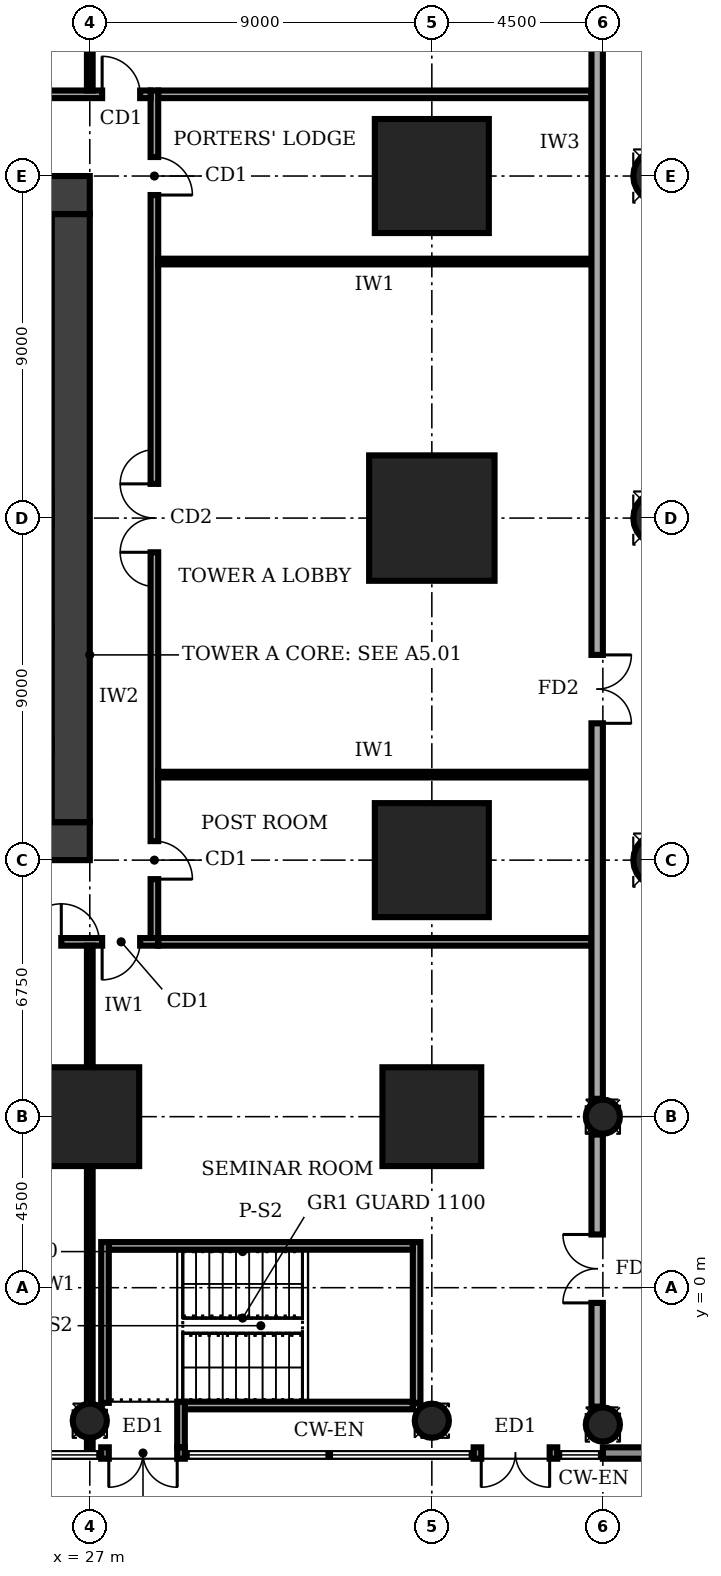
"""IFC4 building model, lengths in metres.
Left out: names, types, materials, properties, quantities, classifications, styles, units other than length and angle.
Written with IfcOpenShell. Run it as: python <this file> out.ifc"""

import sys

from ifc_helpers import new_model, si_unit, direction, frame, frame_2d, origin, origin_2d, place, context, subcontext, project, spatial, rectangle, circle, extrude, element, fill, save


model = new_model("IFC4")
c1 = context("Model", 3, precision=1e-05, world=origin(), true_north=direction((0.0, 1.0)))
c2 = subcontext(c1, "Body", "Model", "MODEL_VIEW")
j1 = project(units=[si_unit("LENGTHUNIT", "METRE"), si_unit("PLANEANGLEUNIT", "RADIAN")], contexts=[c1])
p1 = place(None, origin())
s1 = spatial("IfcSite", under=j1, at=p1, CompositionType="ELEMENT")
p2 = place(p1, origin())
s2 = spatial("IfcBuilding", under=s1, at=p2, CompositionType="ELEMENT")
p3 = place(p2, origin())
s3 = spatial("IfcBuildingStorey", under=s2, at=p3, CompositionType="ELEMENT", Elevation=0.0)
p4 = place(p3, frame((13.5, 11.75, -0.4), z_axis=(0.0, 0.0, 1.0), x_axis=(1.0, 0.0, 0.0)))
e1 = element("IfcWall", 1, at=p4, inside=s3, PredefinedType="SHEAR", context=c2, shape_type="SweptSolid", body=[
    extrude(rectangle(XDim=13.5, YDim=1.0, at=frame_2d((6.75, 0.0))), origin(), (0.0, 0.0, 1.0), 6.4),
])
p5 = place(p4, frame((4.75, 0.0, 0.4)))
e2 = element("IfcOpeningElement", 2, at=p5, cuts=e1, PredefinedType="OPENING", context=c2, shape_type="SweptSolid", body=[
    extrude(rectangle(XDim=1.0, YDim=2.1, at=frame_2d((0.5, 1.05))), frame((0.0, 0.51, 0.0), z_axis=(0.0, -1.0, 0.0), x_axis=(1.0, 0.0, 0.0)), (0.0, 0.0, 1.0), 1.02),
])
p6 = place(p3, frame((26.5, 12.25, -0.4), z_axis=(0.0, 0.0, 1.0), x_axis=(0.0, 1.0, 0.0)))
e3 = element("IfcWall", 3, at=p6, inside=s3, PredefinedType="SHEAR", context=c2, shape_type="SweptSolid", body=[
    extrude(rectangle(XDim=16.0, YDim=1.0, at=frame_2d((8.0, 0.0))), origin(), (0.0, 0.0, 1.0), 6.4),
])
p7 = place(p3, frame((27.0, 28.75, -0.4), z_axis=(0.0, 0.0, 1.0), x_axis=(-1.0, 0.0, 0.0)))
e4 = element("IfcWall", 4, at=p7, inside=s3, PredefinedType="SHEAR", context=c2, shape_type="SweptSolid", body=[
    extrude(rectangle(XDim=13.5, YDim=1.0, at=frame_2d((6.75, 0.0))), origin(), (0.0, 0.0, 1.0), 6.4),
])
p8 = place(p7, frame((4.75, 0.0, 0.4)))
e5 = element("IfcOpeningElement", 5, at=p8, cuts=e4, PredefinedType="OPENING", context=c2, shape_type="SweptSolid", body=[
    extrude(rectangle(XDim=1.8, YDim=2.1, at=frame_2d((0.9, 1.05))), frame((0.0, 0.51, 0.0), z_axis=(0.0, -1.0, 0.0), x_axis=(1.0, 0.0, 0.0)), (0.0, 0.0, 1.0), 1.02),
])
for number, where, z_axis, x_axis in (
    (6, (27.0, 4.5, -0.4), (0.0, 0.0, 1.0), (1.0, 0.0, 0.0)),
    (7, (36.0, 4.5, -0.4), (0.0, 0.0, 1.0), (1.0, 0.0, 0.0)),
):
    element("IfcColumn", number, at=place(p3, frame(where, z_axis=z_axis, x_axis=x_axis)), inside=s3, PredefinedType="COLUMN", context=c2, shape_type="SweptSolid", body=[
        extrude(rectangle(XDim=2.6, YDim=2.6, at=origin_2d()), origin(), (0.0, 0.0, 1.0), 6.4),
    ])
p9 = place(p3, frame((36.0, 11.25, -0.4), z_axis=(0.0, 0.0, 1.0), x_axis=(1.0, 0.0, 0.0)))
e8 = element("IfcColumn", 8, at=p9, inside=s3, PredefinedType="COLUMN", context=c2, shape_type="SweptSolid", body=[
    extrude(rectangle(XDim=3.0, YDim=3.0, at=origin_2d()), origin(), (0.0, 0.0, 1.0), 6.4),
])
p10 = place(p3, frame((36.0, 20.25, -0.4), z_axis=(0.0, 0.0, 1.0), x_axis=(1.0, 0.0, 0.0)))
e9 = element("IfcColumn", 9, at=p10, inside=s3, PredefinedType="COLUMN", context=c2, shape_type="SweptSolid", body=[
    extrude(rectangle(XDim=3.3, YDim=3.3, at=origin_2d()), origin(), (0.0, 0.0, 1.0), 6.4),
])
p11 = place(p3, frame((36.0, 29.25, -0.4), z_axis=(0.0, 0.0, 1.0), x_axis=(1.0, 0.0, 0.0)))
e10 = element("IfcColumn", 10, at=p11, inside=s3, PredefinedType="COLUMN", context=c2, shape_type="SweptSolid", body=[
    extrude(rectangle(XDim=3.0, YDim=3.0, at=origin_2d()), origin(), (0.0, 0.0, 1.0), 6.4),
])
for number, where, z_axis, x_axis in (
    (11, (27.0, -3.5, -0.4), (0.0, 0.0, 1.0), (1.0, 0.0, 0.0)),
    (12, (36.0, -3.5, -0.4), (0.0, 0.0, 1.0), (1.0, 0.0, 0.0)),
    (13, (40.5, -3.6, -0.4), (0.0, 0.0, 1.0), (1.0, 0.0, 0.0)),
    (14, (40.5, 4.5, -0.4), (0.0, 0.0, 1.0), (1.0, 0.0, 0.0)),
):
    element("IfcColumn", number, at=place(p3, frame(where, z_axis=z_axis, x_axis=x_axis)), inside=s3, PredefinedType="COLUMN", context=c2, shape_type="SweptSolid", body=[
        extrude(circle(Radius=0.45, at=origin_2d()), origin(), (0.0, 0.0, 1.0), 6.4),
    ])
for number, where, z_axis, x_axis in (
    (15, (42.0, 11.25, -0.4), (0.0, 0.0, 1.0), (1.0, 0.0, 0.0)),
    (16, (42.0, 20.25, -0.4), (0.0, 0.0, 1.0), (1.0, 0.0, 0.0)),
    (17, (42.0, 29.25, -0.4), (0.0, 0.0, 1.0), (1.0, 0.0, 0.0)),
):
    element("IfcColumn", number, at=place(p3, frame(where, z_axis=z_axis, x_axis=x_axis)), inside=s3, PredefinedType="COLUMN", context=c2, shape_type="SweptSolid", body=[
        extrude(circle(Radius=0.7, at=origin_2d()), origin(), (0.0, 0.0, 1.0), 6.4),
    ])
p12 = place(p3, frame((27.3, -4.35, 0.0), z_axis=(0.0, 0.0, 1.0), x_axis=(1.0, 0.0, 0.0)))
e18 = element("IfcWall", 18, at=p12, inside=s3, PredefinedType="STANDARD", context=c2, shape_type="SweptSolid", body=[
    extrude(rectangle(XDim=2.2, YDim=0.3, at=frame_2d((1.1, 0.0))), origin(), (0.0, 0.0, 1.0), 5.7),
])
p13 = place(p12, frame((0.2, 0.0, 0.0)))
e19 = element("IfcOpeningElement", 19, at=p13, cuts=e18, PredefinedType="OPENING", context=c2, shape_type="SweptSolid", body=[
    extrude(rectangle(XDim=1.8, YDim=2.4, at=frame_2d((0.9, 1.2))), frame((0.0, 0.16, 0.0), z_axis=(0.0, -1.0, 0.0), x_axis=(1.0, 0.0, 0.0)), (0.0, 0.0, 1.0), 0.32),
])
p14 = place(p3, frame((37.1, -4.35, 0.0), z_axis=(0.0, 0.0, 1.0), x_axis=(1.0, 0.0, 0.0)))
e20 = element("IfcWall", 20, at=p14, inside=s3, PredefinedType="STANDARD", context=c2, shape_type="SweptSolid", body=[
    extrude(rectangle(XDim=2.2, YDim=0.3, at=frame_2d((1.1, 0.0))), origin(), (0.0, 0.0, 1.0), 5.7),
])
p15 = place(p14, frame((0.2, 0.0, 0.0)))
e21 = element("IfcOpeningElement", 21, at=p15, cuts=e20, PredefinedType="OPENING", context=c2, shape_type="SweptSolid", body=[
    extrude(rectangle(XDim=1.8, YDim=2.4, at=frame_2d((0.9, 1.2))), frame((0.0, 0.16, 0.0), z_axis=(0.0, -1.0, 0.0), x_axis=(1.0, 0.0, 0.0)), (0.0, 0.0, 1.0), 0.32),
])
p16 = place(p3, frame((40.5, -4.35, 0.0), z_axis=(0.0, 0.0, 1.0), x_axis=(1.0, 0.0, 0.0)))
e22 = element("IfcWall", 22, at=p16, inside=s3, PredefinedType="STANDARD", context=c2, shape_type="SweptSolid", body=[
    extrude(rectangle(XDim=22.5, YDim=0.3, at=frame_2d((11.25, 0.0))), origin(), (0.0, 0.0, 1.0), 5.7),
])
p17 = place(p16, frame((3.6, 0.0, 0.0)))
e23 = element("IfcOpeningElement", 23, at=p17, cuts=e22, PredefinedType="OPENING", context=c2, shape_type="SweptSolid", body=[
    extrude(rectangle(XDim=1.8, YDim=2.4, at=frame_2d((0.9, 1.2))), frame((0.0, 0.16, 0.0), z_axis=(0.0, -1.0, 0.0), x_axis=(1.0, 0.0, 0.0)), (0.0, 0.0, 1.0), 0.32),
])
p18 = place(p16, frame((8.1, 0.0, 0.0)))
e24 = element("IfcOpeningElement", 24, at=p18, cuts=e22, PredefinedType="OPENING", context=c2, shape_type="SweptSolid", body=[
    extrude(rectangle(XDim=1.8, YDim=2.4, at=frame_2d((0.9, 1.2))), frame((0.0, 0.16, 0.0), z_axis=(0.0, -1.0, 0.0), x_axis=(1.0, 0.0, 0.0)), (0.0, 0.0, 1.0), 0.32),
])
p19 = place(p16, frame((18.2, 0.0, 0.0)))
e25 = element("IfcOpeningElement", 25, at=p19, cuts=e22, PredefinedType="OPENING", context=c2, shape_type="SweptSolid", body=[
    extrude(rectangle(XDim=1.8, YDim=2.4, at=frame_2d((0.9, 1.2))), frame((0.0, 0.16, 0.0), z_axis=(0.0, -1.0, 0.0), x_axis=(1.0, 0.0, 0.0)), (0.0, 0.0, 1.0), 0.32),
])
p20 = place(p3, frame((11.9, 9.1, 0.0), z_axis=(0.0, 0.0, 1.0), x_axis=(1.0, 0.0, 0.0)))
e26 = element("IfcWall", 26, at=p20, inside=s3, PredefinedType="SOLIDWALL", context=c2, shape_type="SweptSolid", body=[
    extrude(rectangle(XDim=16.9, YDim=0.2, at=frame_2d((8.45, 0.0))), origin(), (0.0, 0.0, 1.0), 5.7),
])
p21 = place(p20, frame((0.1, 0.0, 0.0)))
e27 = element("IfcOpeningElement", 27, at=p21, cuts=e26, PredefinedType="OPENING", context=c2, shape_type="SweptSolid", body=[
    extrude(rectangle(XDim=1.2, YDim=2.4, at=frame_2d((0.6, 1.2))), frame((0.0, 0.11, 0.0), z_axis=(0.0, -1.0, 0.0), x_axis=(1.0, 0.0, 0.0)), (0.0, 0.0, 1.0), 0.22),
])
p22 = place(p20, frame((2.35, 0.0, 0.0)))
e28 = element("IfcOpeningElement", 28, at=p22, cuts=e26, PredefinedType="OPENING", context=c2, shape_type="SweptSolid", body=[
    extrude(rectangle(XDim=2.0, YDim=2.4, at=frame_2d((1.0, 1.2))), frame((0.0, 0.11, 0.0), z_axis=(0.0, -1.0, 0.0), x_axis=(1.0, 0.0, 0.0)), (0.0, 0.0, 1.0), 0.22),
])
p23 = place(p20, frame((12.35, 0.0, 0.0)))
e29 = element("IfcOpeningElement", 29, at=p23, cuts=e26, PredefinedType="OPENING", context=c2, shape_type="SweptSolid", body=[
    extrude(rectangle(XDim=2.0, YDim=2.4, at=frame_2d((1.0, 1.2))), frame((0.0, 0.11, 0.0), z_axis=(0.0, -1.0, 0.0), x_axis=(1.0, 0.0, 0.0)), (0.0, 0.0, 1.0), 0.22),
])
p24 = place(p20, frame((15.425, 0.0, 0.0)))
e30 = element("IfcOpeningElement", 30, at=p24, cuts=e26, PredefinedType="OPENING", context=c2, shape_type="SweptSolid", body=[
    extrude(rectangle(XDim=1.0, YDim=2.1, at=frame_2d((0.5, 1.05))), frame((0.0, 0.11, 0.0), z_axis=(0.0, -1.0, 0.0), x_axis=(1.0, 0.0, 0.0)), (0.0, 0.0, 1.0), 0.22),
])
p25 = place(p3, frame((28.7, 9.2, 0.0), z_axis=(0.0, 0.0, 1.0), x_axis=(0.0, 1.0, 0.0)))
e31 = element("IfcWall", 31, at=p25, inside=s3, PredefinedType="SOLIDWALL", context=c2, shape_type="SweptSolid", body=[
    extrude(rectangle(XDim=22.3, YDim=0.2, at=frame_2d((11.15, 0.0))), origin(), (0.0, 0.0, 1.0), 5.7),
])
p26 = place(p25, frame((1.55, 0.0, 0.0)))
e32 = element("IfcOpeningElement", 32, at=p26, cuts=e31, PredefinedType="OPENING", context=c2, shape_type="SweptSolid", body=[
    extrude(rectangle(XDim=1.0, YDim=2.1, at=frame_2d((0.5, 1.05))), frame((0.0, 0.11, 0.0), z_axis=(0.0, -1.0, 0.0), x_axis=(1.0, 0.0, 0.0)), (0.0, 0.0, 1.0), 0.22),
])
p27 = place(p25, frame((10.15, 0.0, 0.0)))
e33 = element("IfcOpeningElement", 33, at=p27, cuts=e31, PredefinedType="OPENING", context=c2, shape_type="SweptSolid", body=[
    extrude(rectangle(XDim=1.8, YDim=2.1, at=frame_2d((0.9, 1.05))), frame((0.0, 0.11, 0.0), z_axis=(0.0, -1.0, 0.0), x_axis=(1.0, 0.0, 0.0)), (0.0, 0.0, 1.0), 0.22),
])
p28 = place(p25, frame((19.55, 0.0, 0.0)))
e34 = element("IfcOpeningElement", 34, at=p28, cuts=e31, PredefinedType="OPENING", context=c2, shape_type="SweptSolid", body=[
    extrude(rectangle(XDim=1.0, YDim=2.1, at=frame_2d((0.5, 1.05))), frame((0.0, 0.11, 0.0), z_axis=(0.0, -1.0, 0.0), x_axis=(1.0, 0.0, 0.0)), (0.0, 0.0, 1.0), 0.22),
])
p29 = place(p3, frame((28.6, 31.4, 0.0), z_axis=(0.0, 0.0, 1.0), x_axis=(-1.0, 0.0, 0.0)))
e35 = element("IfcWall", 35, at=p29, inside=s3, PredefinedType="SOLIDWALL", context=c2, shape_type="SweptSolid", body=[
    extrude(rectangle(XDim=16.9, YDim=0.2, at=frame_2d((8.45, 0.0))), origin(), (0.0, 0.0, 1.0), 5.7),
])
p30 = place(p29, frame((15.425, 0.0, 0.0)))
e36 = element("IfcOpeningElement", 36, at=p30, cuts=e35, PredefinedType="OPENING", context=c2, shape_type="SweptSolid", body=[
    extrude(rectangle(XDim=1.0, YDim=2.1, at=frame_2d((0.5, 1.05))), frame((0.0, 0.11, 0.0), z_axis=(0.0, -1.0, 0.0), x_axis=(1.0, 0.0, 0.0)), (0.0, 0.0, 1.0), 0.22),
])
p31 = place(p29, frame((7.45, 0.0, 0.0)))
e37 = element("IfcOpeningElement", 37, at=p31, cuts=e35, PredefinedType="OPENING", context=c2, shape_type="SweptSolid", body=[
    extrude(rectangle(XDim=1.8, YDim=2.1, at=frame_2d((0.9, 1.05))), frame((0.0, 0.11, 0.0), z_axis=(0.0, -1.0, 0.0), x_axis=(1.0, 0.0, 0.0)), (0.0, 0.0, 1.0), 0.22),
])
p32 = place(p29, frame((0.275, 0.0, 0.0)))
e38 = element("IfcOpeningElement", 38, at=p32, cuts=e35, PredefinedType="OPENING", context=c2, shape_type="SweptSolid", body=[
    extrude(rectangle(XDim=1.0, YDim=2.1, at=frame_2d((0.5, 1.05))), frame((0.0, 0.11, 0.0), z_axis=(0.0, -1.0, 0.0), x_axis=(1.0, 0.0, 0.0)), (0.0, 0.0, 1.0), 0.22),
])
for number, where, z_axis, x_axis in (
    (39, (28.8, 9.1, 0.0), (0.0, 0.0, 1.0), (1.0, 0.0, 0.0)),
    (40, (28.8, 31.4, 0.0), (0.0, 0.0, 1.0), (1.0, 0.0, 0.0)),
):
    element("IfcWall", number, at=place(p3, frame(where, z_axis=z_axis, x_axis=x_axis)), inside=s3, PredefinedType="SOLIDWALL", context=c2, shape_type="SweptSolid", body=[
        extrude(rectangle(XDim=11.4, YDim=0.2, at=frame_2d((5.7, 0.0))), origin(), (0.0, 0.0, 1.0), 5.7),
    ])
p33 = place(p3, frame((27.0, -4.32, 0.0), z_axis=(0.0, 0.0, 1.0), x_axis=(0.0, 1.0, 0.0)))
e41 = element("IfcWall", 41, at=p33, inside=s3, PredefinedType="PARTITIONING", context=c2, shape_type="SweptSolid", body=[
    extrude(rectangle(XDim=0.35, YDim=0.15, at=frame_2d((0.175, 0.0))), origin(), (0.0, 0.0, 1.0), 5.7),
])
p34 = place(p3, frame((27.0, -3.03, 0.0), z_axis=(0.0, 0.0, 1.0), x_axis=(0.0, 1.0, 0.0)))
e42 = element("IfcWall", 42, at=p34, inside=s3, PredefinedType="PARTITIONING", context=c2, shape_type="SweptSolid", body=[
    extrude(rectangle(XDim=6.21, YDim=0.15, at=frame_2d((3.105, 0.0))), origin(), (0.0, 0.0, 1.0), 4.7),
])
for number, where, z_axis, x_axis in (
    (43, (27.0, 5.82, 0.0), (0.0, 0.0, 1.0), (0.0, 1.0, 0.0)),
    (44, (27.0, 31.5, 0.0), (0.0, 0.0, 1.0), (0.0, 1.0, 0.0)),
):
    element("IfcWall", number, at=place(p3, frame(where, z_axis=z_axis, x_axis=x_axis)), inside=s3, PredefinedType="PARTITIONING", context=c2, shape_type="SweptSolid", body=[
        extrude(rectangle(XDim=3.18, YDim=0.15, at=frame_2d((1.59, 0.0))), origin(), (0.0, 0.0, 1.0), 4.8),
    ])
for number, where, z_axis, x_axis in (
    (45, (28.8, 13.5, 0.0), (0.0, 0.0, 1.0), (1.0, 0.0, 0.0)),
    (46, (28.8, 27.0, 0.0), (0.0, 0.0, 1.0), (1.0, 0.0, 0.0)),
):
    element("IfcWall", number, at=place(p3, frame(where, z_axis=z_axis, x_axis=x_axis)), inside=s3, PredefinedType="PARTITIONING", context=c2, shape_type="SweptSolid", body=[
        extrude(rectangle(XDim=11.4, YDim=0.15, at=frame_2d((5.7, 0.0))), origin(), (0.0, 0.0, 1.0), 5.7),
    ])
p35 = place(p3, frame((27.5, 1.1, 0.0), z_axis=(0.0, 0.0, 1.0), x_axis=(1.0, 0.0, 0.0)))
e47 = element("IfcWall", 47, at=p35, inside=s3, PredefinedType="SOLIDWALL", context=c2, shape_type="SweptSolid", body=[
    extrude(rectangle(XDim=8.0, YDim=0.2, at=frame_2d((4.0, 0.0))), origin(), (0.0, 0.0, 1.0), 5.7),
])
p36 = place(p3, frame((29.5, -3.1, 0.0), z_axis=(0.0, 0.0, 1.0), x_axis=(1.0, 0.0, 0.0)))
e48 = element("IfcWall", 48, at=p36, inside=s3, PredefinedType="SOLIDWALL", context=c2, shape_type="SweptSolid", body=[
    extrude(rectangle(XDim=6.0, YDim=0.2, at=frame_2d((3.0, 0.0))), origin(), (0.0, 0.0, 1.0), 5.7),
])
p37 = place(p3, frame((29.4, -3.0, 0.0), z_axis=(0.0, 0.0, 1.0), x_axis=(0.0, -1.0, 0.0)))
e49 = element("IfcWall", 49, at=p37, inside=s3, PredefinedType="SOLIDWALL", context=c2, shape_type="SweptSolid", body=[
    extrude(rectangle(XDim=1.2, YDim=0.2, at=frame_2d((0.6, 0.0))), origin(), (0.0, 0.0, 1.0), 5.7),
])
for number, where, z_axis, x_axis in (
    (50, (27.4, -3.03, 0.0), (0.0, 0.0, 1.0), (0.0, 1.0, 0.0)),
    (51, (35.6, -3.03, 0.0), (0.0, 0.0, 1.0), (0.0, 1.0, 0.0)),
):
    element("IfcWall", number, at=place(p3, frame(where, z_axis=z_axis, x_axis=x_axis)), inside=s3, PredefinedType="SOLIDWALL", context=c2, shape_type="SweptSolid", body=[
        extrude(rectangle(XDim=4.23, YDim=0.2, at=frame_2d((2.115, 0.0))), origin(), (0.0, 0.0, 1.0), 5.7),
    ])
p38 = place(p3, frame((40.35, -3.13, 0.0), z_axis=(0.0, 0.0, 1.0), x_axis=(0.0, 1.0, 0.0)))
e52 = element("IfcWall", 52, at=p38, inside=s3, PredefinedType="SOLIDWALL", context=c2, shape_type="SweptSolid", body=[
    extrude(rectangle(XDim=7.16, YDim=0.3, at=frame_2d((3.58, 0.0))), origin(), (0.0, 0.0, 1.0), 4.7),
])
p39 = place(p38, frame((2.73, 0.0, 0.0)))
e53 = element("IfcOpeningElement", 53, at=p39, cuts=e52, PredefinedType="OPENING", context=c2, shape_type="SweptSolid", body=[
    extrude(rectangle(XDim=1.8, YDim=2.1, at=frame_2d((0.9, 1.05))), frame((0.0, 0.16, 0.0), z_axis=(0.0, -1.0, 0.0), x_axis=(1.0, 0.0, 0.0)), (0.0, 0.0, 1.0), 0.32),
])
p40 = place(p3, frame((40.35, 4.97, 0.0), z_axis=(0.0, 0.0, 1.0), x_axis=(0.0, 1.0, 0.0)))
e54 = element("IfcWall", 54, at=p40, inside=s3, PredefinedType="SOLIDWALL", context=c2, shape_type="SweptSolid", body=[
    extrude(rectangle(XDim=43.16, YDim=0.3, at=frame_2d((21.58, 0.0))), origin(), (0.0, 0.0, 1.0), 5.7),
])
p41 = place(p40, frame((9.88, 0.0, 0.0)))
e55 = element("IfcOpeningElement", 55, at=p41, cuts=e54, PredefinedType="OPENING", context=c2, shape_type="SweptSolid", body=[
    extrude(rectangle(XDim=1.8, YDim=2.1, at=frame_2d((0.9, 1.05))), frame((0.0, 0.16, 0.0), z_axis=(0.0, -1.0, 0.0), x_axis=(1.0, 0.0, 0.0)), (0.0, 0.0, 1.0), 0.32),
])
p42 = place(p40, frame((38.63, 0.0, 0.0)))
e56 = element("IfcOpeningElement", 56, at=p42, cuts=e54, PredefinedType="OPENING", context=c2, shape_type="SweptSolid", body=[
    extrude(rectangle(XDim=1.8, YDim=2.1, at=frame_2d((0.9, 1.05))), frame((0.0, 0.16, 0.0), z_axis=(0.0, -1.0, 0.0), x_axis=(1.0, 0.0, 0.0)), (0.0, 0.0, 1.0), 0.32),
])
p43 = place(p13, frame((1.8, 0.0, 0.0), z_axis=(0.0, 0.0, 1.0), x_axis=(-1.0, 0.0, 0.0)))
e57 = element("IfcDoor", 57, at=p43, inside=s3, OperationType="DOUBLE_DOOR_SINGLE_SWING", PredefinedType="DOOR", context=c2, shape_type="SweptSolid", body=[
    extrude(rectangle(XDim=1.8, YDim=2.4, at=frame_2d((0.9, 1.2))), frame((0.0, 0.025, 0.0), z_axis=(0.0, -1.0, 0.0), x_axis=(1.0, 0.0, 0.0)), (0.0, 0.0, 1.0), 0.05),
])
fill(e19, e57)
p44 = place(p15, frame((1.8, 0.0, 0.0), z_axis=(0.0, 0.0, 1.0), x_axis=(-1.0, 0.0, 0.0)))
e58 = element("IfcDoor", 58, at=p44, inside=s3, OperationType="DOUBLE_DOOR_SINGLE_SWING", PredefinedType="DOOR", context=c2, shape_type="SweptSolid", body=[
    extrude(rectangle(XDim=1.8, YDim=2.4, at=frame_2d((0.9, 1.2))), frame((0.0, 0.025, 0.0), z_axis=(0.0, -1.0, 0.0), x_axis=(1.0, 0.0, 0.0)), (0.0, 0.0, 1.0), 0.05),
])
fill(e21, e58)
p45 = place(p23, origin())
e59 = element("IfcDoor", 59, at=p45, inside=s3, OperationType="DOUBLE_DOOR_SINGLE_SWING", PredefinedType="DOOR", context=c2, shape_type="SweptSolid", body=[
    extrude(rectangle(XDim=2.0, YDim=2.4, at=frame_2d((1.0, 1.2))), frame((0.0, 0.025, 0.0), z_axis=(0.0, -1.0, 0.0), x_axis=(1.0, 0.0, 0.0)), (0.0, 0.0, 1.0), 0.05),
])
fill(e29, e59)
p46 = place(p24, frame((1.0, 0.0, 0.0), z_axis=(0.0, 0.0, 1.0), x_axis=(-1.0, 0.0, 0.0)))
e60 = element("IfcDoor", 60, at=p46, inside=s3, OperationType="SINGLE_SWING_RIGHT", PredefinedType="DOOR", context=c2, shape_type="SweptSolid", body=[
    extrude(rectangle(XDim=1.0, YDim=2.1, at=frame_2d((0.5, 1.05))), frame((0.0, 0.025, 0.0), z_axis=(0.0, -1.0, 0.0), x_axis=(1.0, 0.0, 0.0)), (0.0, 0.0, 1.0), 0.05),
])
fill(e30, e60)
p47 = place(p26, frame((1.0, 0.0, 0.0), z_axis=(0.0, 0.0, 1.0), x_axis=(-1.0, 0.0, 0.0)))
e61 = element("IfcDoor", 61, at=p47, inside=s3, OperationType="SINGLE_SWING_RIGHT", PredefinedType="DOOR", context=c2, shape_type="SweptSolid", body=[
    extrude(rectangle(XDim=1.0, YDim=2.1, at=frame_2d((0.5, 1.05))), frame((0.0, 0.025, 0.0), z_axis=(0.0, -1.0, 0.0), x_axis=(1.0, 0.0, 0.0)), (0.0, 0.0, 1.0), 0.05),
])
fill(e32, e61)
p48 = place(p27, origin())
e62 = element("IfcDoor", 62, at=p48, inside=s3, OperationType="DOUBLE_DOOR_SINGLE_SWING", PredefinedType="DOOR", context=c2, shape_type="SweptSolid", body=[
    extrude(rectangle(XDim=1.8, YDim=2.1, at=frame_2d((0.9, 1.05))), frame((0.0, 0.025, 0.0), z_axis=(0.0, -1.0, 0.0), x_axis=(1.0, 0.0, 0.0)), (0.0, 0.0, 1.0), 0.05),
])
fill(e33, e62)
p49 = place(p28, frame((1.0, 0.0, 0.0), z_axis=(0.0, 0.0, 1.0), x_axis=(-1.0, 0.0, 0.0)))
e63 = element("IfcDoor", 63, at=p49, inside=s3, OperationType="SINGLE_SWING_RIGHT", PredefinedType="DOOR", context=c2, shape_type="SweptSolid", body=[
    extrude(rectangle(XDim=1.0, YDim=2.1, at=frame_2d((0.5, 1.05))), frame((0.0, 0.025, 0.0), z_axis=(0.0, -1.0, 0.0), x_axis=(1.0, 0.0, 0.0)), (0.0, 0.0, 1.0), 0.05),
])
fill(e34, e63)
p50 = place(p32, frame((1.0, 0.0, 0.0), z_axis=(0.0, 0.0, 1.0), x_axis=(-1.0, 0.0, 0.0)))
e64 = element("IfcDoor", 64, at=p50, inside=s3, OperationType="SINGLE_SWING_LEFT", PredefinedType="DOOR", context=c2, shape_type="SweptSolid", body=[
    extrude(rectangle(XDim=1.0, YDim=2.1, at=frame_2d((0.5, 1.05))), frame((0.0, 0.025, 0.0), z_axis=(0.0, -1.0, 0.0), x_axis=(1.0, 0.0, 0.0)), (0.0, 0.0, 1.0), 0.05),
])
fill(e38, e64)
p51 = place(p39, origin())
e65 = element("IfcDoor", 65, at=p51, inside=s3, OperationType="DOUBLE_DOOR_SINGLE_SWING", PredefinedType="DOOR", context=c2, shape_type="SweptSolid", body=[
    extrude(rectangle(XDim=1.8, YDim=2.1, at=frame_2d((0.9, 1.05))), frame((0.0, 0.025, 0.0), z_axis=(0.0, -1.0, 0.0), x_axis=(1.0, 0.0, 0.0)), (0.0, 0.0, 1.0), 0.05),
])
fill(e53, e65)
p52 = place(p41, frame((1.8, 0.0, 0.0), z_axis=(0.0, 0.0, 1.0), x_axis=(-1.0, 0.0, 0.0)))
e66 = element("IfcDoor", 66, at=p52, inside=s3, OperationType="DOUBLE_DOOR_SINGLE_SWING", PredefinedType="DOOR", context=c2, shape_type="SweptSolid", body=[
    extrude(rectangle(XDim=1.8, YDim=2.1, at=frame_2d((0.9, 1.05))), frame((0.0, 0.025, 0.0), z_axis=(0.0, -1.0, 0.0), x_axis=(1.0, 0.0, 0.0)), (0.0, 0.0, 1.0), 0.05),
])
fill(e55, e66)
save(model, sys.argv[1])
